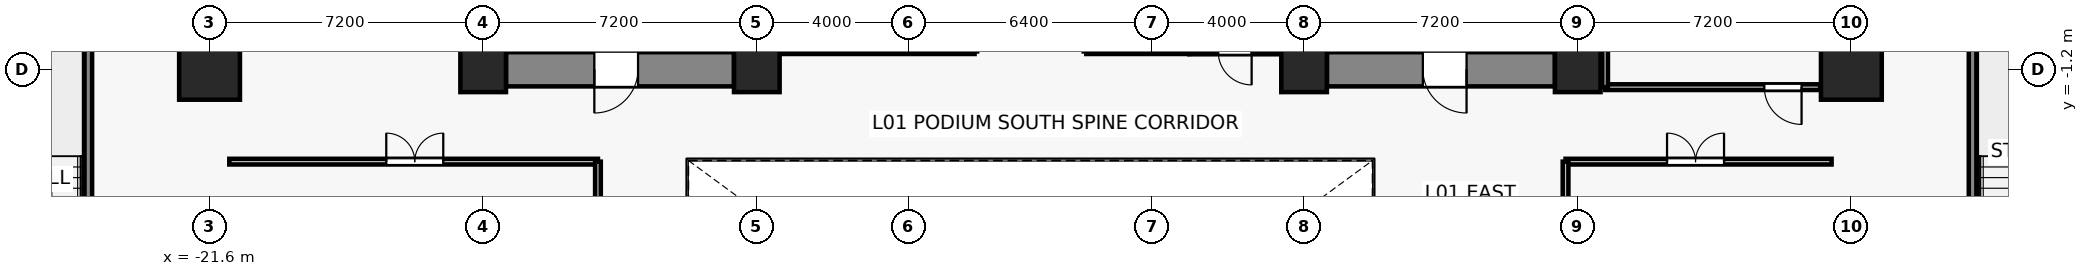
"""IFC4 building model, lengths in metres.
Left out: names, types, materials, properties, quantities, classifications, styles, units other than length and angle.
Written with IfcOpenShell. Run it as: python <this file> out.ifc"""

import sys

from ifc_helpers import new_model, si_unit, direction, frame, frame_2d, origin, origin_2d, place, context, subcontext, project, spatial, rectangle, extrude, source, transform, mapped, element, fill, save


model = new_model("IFC4")
c1 = context("Model", 3, precision=1e-05, world=origin(), true_north=direction((0.0, 1.0)))
c2 = subcontext(c1, "Body", "Model", "MODEL_VIEW")
j1 = project(units=[si_unit("LENGTHUNIT", "METRE"), si_unit("PLANEANGLEUNIT", "RADIAN")], contexts=[c1])
p1 = place(None, origin())
s1 = spatial("IfcSite", under=j1, at=p1, CompositionType="ELEMENT")
p2 = place(p1, origin())
s2 = spatial("IfcBuilding", under=s1, at=p2, CompositionType="ELEMENT")
p3 = place(p2, frame((0.0, 0.0, 5.0)))
s3 = spatial("IfcBuildingStorey", under=s2, at=p3, CompositionType="ELEMENT", Elevation=5.0)
for number, where, z_axis, x_axis in (
    (1, (-14.4, -1.2, 0.0), (0.0, 0.0, 1.0), (1.0, 0.0, 0.0)),
    (2, (-7.2, -1.2, 0.0), (0.0, 0.0, 1.0), (1.0, 0.0, 0.0)),
    (3, (7.2, -1.2, 0.0), (0.0, 0.0, 1.0), (1.0, 0.0, 0.0)),
    (4, (14.4, -1.2, 0.0), (0.0, 0.0, 1.0), (1.0, 0.0, 0.0)),
):
    element("IfcColumn", number, at=place(p3, frame(where, z_axis=z_axis, x_axis=x_axis)), inside=s3, PredefinedType="COLUMN", context=c2, shape_type="SweptSolid", body=[
        extrude(rectangle(XDim=1.2, YDim=1.2, at=origin_2d()), origin(), (0.0, 0.0, 1.0), 4.4),
    ])
for number, where, z_axis, x_axis in (
    (5, (-21.6, -1.2, 0.0), (0.0, 0.0, 1.0), (1.0, 0.0, 0.0)),
    (6, (21.6, -1.2, 0.0), (0.0, 0.0, 1.0), (1.0, 0.0, 0.0)),
):
    element("IfcColumn", number, at=place(p3, frame(where, z_axis=z_axis, x_axis=x_axis)), inside=s3, PredefinedType="COLUMN", context=c2, shape_type="SweptSolid", body=[
        extrude(rectangle(XDim=1.6, YDim=1.6, at=origin_2d()), origin(), (0.0, 0.0, 1.0), 4.4),
    ])
p4 = place(p3, frame((-7.8, -1.2, 0.0), z_axis=(0.0, 0.0, 1.0), x_axis=(-1.0, 0.0, 0.0)))
e7 = element("IfcWall", 7, at=p4, inside=s3, PredefinedType="SHEAR", context=c2, shape_type="SweptSolid", body=[
    extrude(rectangle(XDim=6.0, YDim=0.9, at=frame_2d((3.0, 0.0))), origin(), (0.0, 0.0, 1.0), 4.1),
])
p5 = place(p4, frame((2.525, 0.0, 0.0)))
e8 = element("IfcOpeningElement", 8, at=p5, cuts=e7, PredefinedType="OPENING", context=c2, shape_type="SweptSolid", body=[
    extrude(rectangle(XDim=1.15, YDim=2.15, at=frame_2d((0.575, 1.075))), frame((0.0, 0.46, 0.0), z_axis=(0.0, -1.0, 0.0), x_axis=(1.0, 0.0, 0.0)), (0.0, 0.0, 1.0), 0.92),
])
p6 = place(p3, frame((13.8, -1.2, 0.0), z_axis=(0.0, 0.0, 1.0), x_axis=(-1.0, 0.0, 0.0)))
e9 = element("IfcWall", 9, at=p6, inside=s3, PredefinedType="SHEAR", context=c2, shape_type="SweptSolid", body=[
    extrude(rectangle(XDim=6.0, YDim=0.9, at=frame_2d((3.0, 0.0))), origin(), (0.0, 0.0, 1.0), 4.1),
])
p7 = place(p6, frame((2.325, 0.0, 0.0)))
e10 = element("IfcOpeningElement", 10, at=p7, cuts=e9, PredefinedType="OPENING", context=c2, shape_type="SweptSolid", body=[
    extrude(rectangle(XDim=1.15, YDim=2.15, at=frame_2d((0.575, 1.075))), frame((0.0, 0.46, 0.0), z_axis=(0.0, -1.0, 0.0), x_axis=(1.0, 0.0, 0.0)), (0.0, 0.0, 1.0), 0.92),
])
p8 = place(p3, frame((-1.47, -0.73, 0.0), z_axis=(0.0, 0.0, 1.0), x_axis=(-1.0, 0.0, 0.0)))
e11 = element("IfcWall", 11, at=p8, inside=s3, PredefinedType="PARTITIONING", context=c2, shape_type="SweptSolid", body=[
    extrude(rectangle(XDim=5.11, YDim=0.135, at=frame_2d((2.555, 0.0))), origin(), (0.0, 0.0, 1.0), 4.1),
])
p9 = place(p3, frame((4.18, -0.73, 0.0), z_axis=(0.0, 0.0, 1.0), x_axis=(-1.0, 0.0, 0.0)))
e12 = element("IfcWall", 12, at=p9, inside=s3, PredefinedType="PARTITIONING", context=c2, shape_type="SweptSolid", body=[
    extrude(rectangle(XDim=2.71, YDim=0.135, at=frame_2d((1.355, 0.0))), origin(), (0.0, 0.0, 1.0), 4.1),
])
p10 = place(p3, frame((6.58, -0.73, 0.0), z_axis=(0.0, 0.0, 1.0), x_axis=(-1.0, 0.0, 0.0)))
e13 = element("IfcWall", 13, at=p10, inside=s3, PredefinedType="PARTITIONING", context=c2, shape_type="SweptSolid", body=[
    extrude(rectangle(XDim=2.4, YDim=0.15, at=frame_2d((1.2, 0.0))), origin(), (0.0, 0.0, 1.0), 4.1),
])
p11 = place(p10, frame((0.76, 0.0, 0.0)))
e14 = element("IfcOpeningElement", 14, at=p11, cuts=e13, PredefinedType="OPENING", context=c2, shape_type="SweptSolid", body=[
    extrude(rectangle(XDim=0.88, YDim=2.1, at=frame_2d((0.44, 1.05))), frame((0.0, 0.085, 0.0), z_axis=(0.0, -1.0, 0.0), x_axis=(1.0, 0.0, 0.0)), (0.0, 0.0, 1.0), 0.17),
])
for number, where, z_axis, x_axis in (
    (15, (-24.79, 0.16, 0.0), (0.0, 0.0, 1.0), (0.0, -1.0, 0.0)),
    (16, (24.79, -8.76, 0.0), (0.0, 0.0, 1.0), (0.0, 1.0, 0.0)),
):
    element("IfcWall", number, at=place(p3, frame(where, z_axis=z_axis, x_axis=x_axis)), inside=s3, PredefinedType="SOLIDWALL", context=c2, shape_type="SweptSolid", body=[
        extrude(rectangle(XDim=8.92, YDim=0.2, at=frame_2d((4.46, 0.0))), origin(), (0.0, 0.0, 1.0), 4.1),
    ])
p12 = place(p3, frame((-21.08, -3.63, 0.0), z_axis=(0.0, 0.0, 1.0), x_axis=(1.0, 0.0, 0.0)))
e17 = element("IfcWall", 17, at=p12, inside=s3, PredefinedType="PARTITIONING", context=c2, shape_type="SweptSolid", body=[
    extrude(rectangle(XDim=9.7, YDim=0.15, at=frame_2d((4.85, 0.0))), origin(), (0.0, 0.0, 1.0), 3.239),
])
p13 = place(p12, frame((4.13, 0.0, 0.0)))
e18 = element("IfcOpeningElement", 18, at=p13, cuts=e17, PredefinedType="OPENING", context=c2, shape_type="SweptSolid", body=[
    extrude(rectangle(XDim=1.5, YDim=2.2, at=frame_2d((0.75, 1.1))), frame((0.0, 0.085, 0.0), z_axis=(0.0, -1.0, 0.0), x_axis=(1.0, 0.0, 0.0)), (0.0, 0.0, 1.0), 0.17),
])
p14 = place(p3, frame((-11.38, -3.63, 0.0), z_axis=(0.0, 0.0, 1.0), x_axis=(0.0, -1.0, 0.0)))
e19 = element("IfcWall", 19, at=p14, inside=s3, PredefinedType="PARTITIONING", context=c2, shape_type="SweptSolid", body=[
    extrude(rectangle(XDim=18.65, YDim=0.15, at=frame_2d((9.325, 0.0))), origin(), (0.0, 0.0, 1.0), 3.19),
])
p15 = place(p3, frame((14.08, -3.63, 0.0), z_axis=(0.0, 0.0, 1.0), x_axis=(1.0, 0.0, 0.0)))
e20 = element("IfcWall", 20, at=p15, inside=s3, PredefinedType="PARTITIONING", context=c2, shape_type="SweptSolid", body=[
    extrude(rectangle(XDim=7.0, YDim=0.15, at=frame_2d((3.5, 0.0))), origin(), (0.0, 0.0, 1.0), 3.239),
])
p16 = place(p15, frame((2.67, 0.0, 0.0)))
e21 = element("IfcOpeningElement", 21, at=p16, cuts=e20, PredefinedType="OPENING", context=c2, shape_type="SweptSolid", body=[
    extrude(rectangle(XDim=1.5, YDim=2.2, at=frame_2d((0.75, 1.1))), frame((0.0, 0.085, 0.0), z_axis=(0.0, -1.0, 0.0), x_axis=(1.0, 0.0, 0.0)), (0.0, 0.0, 1.0), 0.17),
])
p17 = place(p3, frame((14.08, -7.05, 0.0), z_axis=(0.0, 0.0, 1.0), x_axis=(0.0, 1.0, 0.0)))
e22 = element("IfcWall", 22, at=p17, inside=s3, PredefinedType="PARTITIONING", context=c2, shape_type="SweptSolid", body=[
    extrude(rectangle(XDim=3.42, YDim=0.15, at=frame_2d((1.71, 0.0))), origin(), (0.0, 0.0, 1.0), 3.29),
])
p18 = place(p3, frame((20.78, -1.67, 0.0), z_axis=(0.0, 0.0, 1.0), x_axis=(-1.0, 0.0, 0.0)))
e23 = element("IfcWall", 23, at=p18, inside=s3, PredefinedType="PARTITIONING", context=c2, shape_type="SweptSolid", body=[
    extrude(rectangle(XDim=5.66, YDim=0.15, at=frame_2d((2.83, 0.0))), origin(), (0.0, 0.0, 1.0), 4.1),
])
p19 = place(p18, frame((0.49, 0.0, 0.0)))
e24 = element("IfcOpeningElement", 24, at=p19, cuts=e23, PredefinedType="OPENING", context=c2, shape_type="SweptSolid", body=[
    extrude(rectangle(XDim=0.98, YDim=2.15, at=frame_2d((0.49, 1.075))), frame((0.0, 0.085, 0.0), z_axis=(0.0, -1.0, 0.0), x_axis=(1.0, 0.0, 0.0)), (0.0, 0.0, 1.0), 0.17),
])
p20 = place(p3, frame((15.12, -1.67, 0.0), z_axis=(0.0, 0.0, 1.0), x_axis=(0.0, 1.0, 0.0)))
e25 = element("IfcWall", 25, at=p20, inside=s3, PredefinedType="PARTITIONING", context=c2, shape_type="SweptSolid", body=[
    extrude(rectangle(XDim=15.15, YDim=0.15, at=frame_2d((7.575, 0.0))), origin(), (0.0, 0.0, 1.0), 3.19),
])
m1 = source(origin(), c2, "Body", "SweptSolid", [
    extrude(rectangle(XDim=1.15, YDim=2.15, at=frame_2d((0.575, 1.075))), frame((0.0, 0.025, 0.0), z_axis=(0.0, -1.0, 0.0), x_axis=(1.0, 0.0, 0.0)), (0.0, 0.0, 1.0), 0.05),
])
p21 = place(p5, origin())
e26 = element("IfcDoor", 26, at=p21, inside=s3, OperationType="SINGLE_SWING_RIGHT", PredefinedType="DOOR", context=c2, shape_type="MappedRepresentation", body=[
    mapped(m1, transform((0.0, 0.0, 0.0), x_axis=(1.0, 0.0, 0.0), y_axis=(0.0, 1.0, 0.0), z_axis=(0.0, 0.0, 1.0), scale=1.0)),
])
fill(e8, e26)
p22 = place(p7, origin())
e27 = element("IfcDoor", 27, at=p22, inside=s3, OperationType="SINGLE_SWING_LEFT", PredefinedType="DOOR", context=c2, shape_type="MappedRepresentation", body=[
    mapped(m1, transform((0.0, 0.0, 0.0), x_axis=(1.0, 0.0, 0.0), y_axis=(0.0, 1.0, 0.0), z_axis=(0.0, 0.0, 1.0), scale=1.0)),
])
fill(e10, e27)
m2 = source(origin(), c2, "Body", "SweptSolid", [
    extrude(rectangle(XDim=0.88, YDim=2.1, at=frame_2d((0.44, 1.05))), frame((0.0, 0.025, 0.0), z_axis=(0.0, -1.0, 0.0), x_axis=(1.0, 0.0, 0.0)), (0.0, 0.0, 1.0), 0.05),
])
p23 = place(p11, origin())
e28 = element("IfcDoor", 28, at=p23, inside=s3, OperationType="SINGLE_SWING_LEFT", PredefinedType="DOOR", context=c2, shape_type="MappedRepresentation", body=[
    mapped(m2, transform((0.0, 0.0, 0.0), x_axis=(1.0, 0.0, 0.0), y_axis=(0.0, 1.0, 0.0), z_axis=(0.0, 0.0, 1.0), scale=1.0)),
])
fill(e14, e28)
m3 = source(origin(), c2, "Body", "SweptSolid", [
    extrude(rectangle(XDim=1.5, YDim=2.2, at=frame_2d((0.75, 1.1))), frame((0.0, 0.025, 0.0), z_axis=(0.0, -1.0, 0.0), x_axis=(1.0, 0.0, 0.0)), (0.0, 0.0, 1.0), 0.05),
])
p24 = place(p13, origin())
e29 = element("IfcDoor", 29, at=p24, inside=s3, OperationType="DOUBLE_DOOR_SINGLE_SWING", PredefinedType="DOOR", context=c2, shape_type="MappedRepresentation", body=[
    mapped(m3, transform((0.0, 0.0, 0.0), x_axis=(1.0, 0.0, 0.0), y_axis=(0.0, 1.0, 0.0), z_axis=(0.0, 0.0, 1.0), scale=1.0)),
])
fill(e18, e29)
p25 = place(p16, origin())
e30 = element("IfcDoor", 30, at=p25, inside=s3, OperationType="DOUBLE_DOOR_SINGLE_SWING", PredefinedType="DOOR", context=c2, shape_type="MappedRepresentation", body=[
    mapped(m3, transform((0.0, 0.0, 0.0), x_axis=(1.0, 0.0, 0.0), y_axis=(0.0, 1.0, 0.0), z_axis=(0.0, 0.0, 1.0), scale=1.0)),
])
fill(e21, e30)
m4 = source(origin(), c2, "Body", "SweptSolid", [
    extrude(rectangle(XDim=0.98, YDim=2.15, at=frame_2d((0.49, 1.075))), frame((0.0, 0.025, 0.0), z_axis=(0.0, -1.0, 0.0), x_axis=(1.0, 0.0, 0.0)), (0.0, 0.0, 1.0), 0.05),
])
p26 = place(p19, origin())
e31 = element("IfcDoor", 31, at=p26, inside=s3, OperationType="SINGLE_SWING_LEFT", PredefinedType="DOOR", context=c2, shape_type="MappedRepresentation", body=[
    mapped(m4, transform((0.0, 0.0, 0.0), x_axis=(1.0, 0.0, 0.0), y_axis=(0.0, 1.0, 0.0), z_axis=(0.0, 0.0, 1.0), scale=1.0)),
])
fill(e24, e31)
save(model, sys.argv[1])
